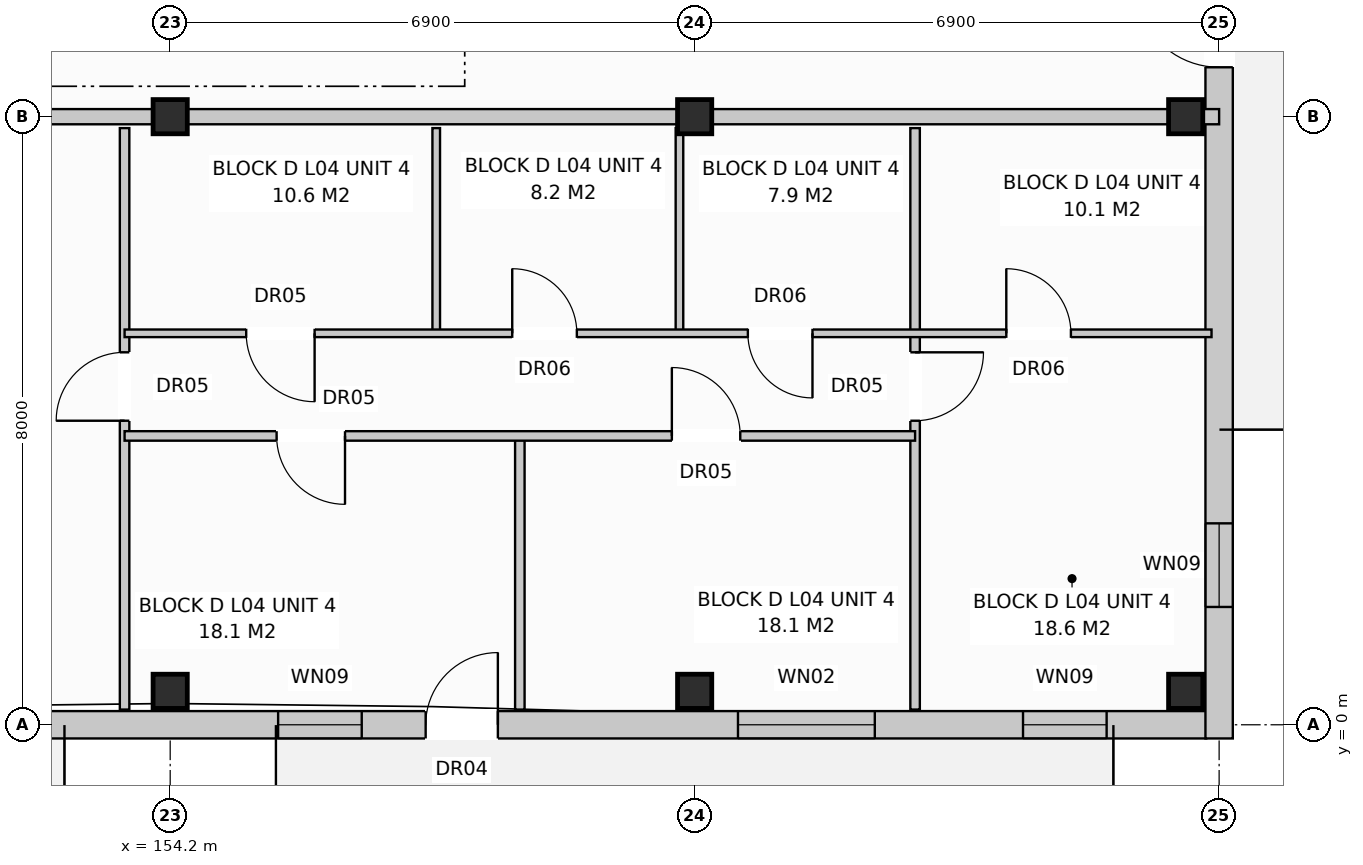
"""IFC4 building model, lengths in metres.
Left out: names, types, materials, properties, quantities, classifications, styles, units other than length and angle.
Written with IfcOpenShell. Run it as: python <this file> out.ifc"""

import sys

from ifc_helpers import new_model, si_unit, direction, frame, frame_2d, origin, origin_with_axes, origin_2d, place, context, subcontext, project, spatial, rectangle, extrude, element, fill, save


model = new_model("IFC4")
c1 = context("Model", 3, precision=1e-05, world=origin(), true_north=direction((0.0, 1.0)))
c2 = subcontext(c1, "Body", "Model", "MODEL_VIEW")
j1 = project(units=[si_unit("LENGTHUNIT", "METRE"), si_unit("PLANEANGLEUNIT", "RADIAN")], contexts=[c1])
p1 = place(None, origin())
s1 = spatial("IfcSite", under=j1, at=p1, CompositionType="ELEMENT")
p2 = place(p1, origin())
s2 = spatial("IfcBuilding", under=s1, at=p2, CompositionType="ELEMENT")
p3 = place(p2, frame((0.0, 0.0, 14.4)))
s3 = spatial("IfcBuildingStorey", under=s2, at=p3, CompositionType="ELEMENT", Elevation=14.4)
for number, where, z_axis, x_axis in (
    (1, (154.2, 0.44, 0.0), (0.0, 0.0, 1.0), (1.0, 0.0, 0.0)),
    (2, (154.2, 8.0, 0.0), (0.0, 0.0, 1.0), (1.0, 0.0, 0.0)),
    (3, (161.1, 0.44, 0.0), (0.0, 0.0, 1.0), (1.0, 0.0, 0.0)),
    (4, (161.1, 8.0, 0.0), (0.0, 0.0, 1.0), (1.0, 0.0, 0.0)),
    (5, (167.56, 0.44, 0.0), (0.0, 0.0, 1.0), (1.0, 0.0, 0.0)),
    (6, (167.56, 8.0, 0.0), (0.0, 0.0, 1.0), (1.0, 0.0, 0.0)),
):
    element("IfcColumn", number, at=place(p3, frame(where, z_axis=z_axis, x_axis=x_axis)), inside=s3, PredefinedType="COLUMN", context=c2, shape_type="SweptSolid", body=[
        extrude(rectangle(XDim=0.45, YDim=0.45, at=origin_2d()), origin(), (0.0, 0.0, 1.0), 3.2),
    ])
p4 = place(p3, frame((112.97, 0.0, 0.0), z_axis=(0.0, 0.0, 1.0), x_axis=(1.0, 0.0, 0.0)))
e7 = element("IfcWall", 7, at=p4, inside=s3, PredefinedType="STANDARD", context=c2, shape_type="SweptSolid", body=[
    extrude(rectangle(XDim=54.86, YDim=0.36, at=frame_2d((27.43, 0.0))), origin(), (0.0, 0.0, 1.0), 2.94),
])
p5 = place(p4, frame((5.127, 0.0, 0.0)))
e8 = element("IfcOpeningElement", 8, at=p5, cuts=e7, PredefinedType="OPENING", context=c2, shape_type="SweptSolid", body=[
    extrude(rectangle(XDim=0.95, YDim=2.1, at=frame_2d((0.475, 1.05))), frame((0.0, 0.192, 0.0), z_axis=(0.0, -1.0, 0.0), x_axis=(1.0, 0.0, 0.0)), (0.0, 0.0, 1.0), 0.384),
])
p6 = place(p4, frame((18.9, 0.0, 0.0)))
e9 = element("IfcOpeningElement", 9, at=p6, cuts=e7, PredefinedType="OPENING", context=c2, shape_type="SweptSolid", body=[
    extrude(rectangle(XDim=0.95, YDim=2.1, at=frame_2d((0.475, 1.05))), frame((0.0, 0.192, 0.0), z_axis=(0.0, -1.0, 0.0), x_axis=(1.0, 0.0, 0.0)), (0.0, 0.0, 1.0), 0.384),
])
p7 = place(p4, frame((32.7, 0.0, 0.0)))
e10 = element("IfcOpeningElement", 10, at=p7, cuts=e7, PredefinedType="OPENING", context=c2, shape_type="SweptSolid", body=[
    extrude(rectangle(XDim=0.95, YDim=2.1, at=frame_2d((0.475, 1.05))), frame((0.0, 0.192, 0.0), z_axis=(0.0, -1.0, 0.0), x_axis=(1.0, 0.0, 0.0)), (0.0, 0.0, 1.0), 0.384),
])
p8 = place(p4, frame((44.591, 0.0, 0.0)))
e11 = element("IfcOpeningElement", 11, at=p8, cuts=e7, PredefinedType="OPENING", context=c2, shape_type="SweptSolid", body=[
    extrude(rectangle(XDim=0.95, YDim=2.1, at=frame_2d((0.475, 1.05))), frame((0.0, 0.192, 0.0), z_axis=(0.0, -1.0, 0.0), x_axis=(1.0, 0.0, 0.0)), (0.0, 0.0, 1.0), 0.384),
])
p9 = place(p4, frame((0.9, 0.0, 0.8)))
e12 = element("IfcOpeningElement", 12, at=p9, cuts=e7, PredefinedType="OPENING", context=c2, shape_type="SweptSolid", body=[
    extrude(rectangle(XDim=1.8, YDim=1.7, at=frame_2d((0.9, 0.85))), frame((0.0, 0.192, 0.0), z_axis=(0.0, -1.0, 0.0), x_axis=(1.0, 0.0, 0.0)), (0.0, 0.0, 1.0), 0.384),
])
p10 = place(p4, frame((8.35, 0.0, 0.72)))
e13 = element("IfcOpeningElement", 13, at=p10, cuts=e7, PredefinedType="OPENING", context=c2, shape_type="SweptSolid", body=[
    extrude(rectangle(XDim=1.1, YDim=1.5, at=frame_2d((0.55, 0.75))), frame((0.0, 0.192, 0.0), z_axis=(0.0, -1.0, 0.0), x_axis=(1.0, 0.0, 0.0)), (0.0, 0.0, 1.0), 0.384),
])
p11 = place(p4, frame((11.225, 0.0, 0.8)))
e14 = element("IfcOpeningElement", 14, at=p11, cuts=e7, PredefinedType="OPENING", context=c2, shape_type="SweptSolid", body=[
    extrude(rectangle(XDim=1.95, YDim=1.65, at=frame_2d((0.975, 0.825))), frame((0.0, 0.192, 0.0), z_axis=(0.0, -1.0, 0.0), x_axis=(1.0, 0.0, 0.0)), (0.0, 0.0, 1.0), 0.384),
])
p12 = place(p4, frame((16.8, 0.0, 0.8)))
e15 = element("IfcOpeningElement", 15, at=p12, cuts=e7, PredefinedType="OPENING", context=c2, shape_type="SweptSolid", body=[
    extrude(rectangle(XDim=1.8, YDim=1.7, at=frame_2d((0.9, 0.85))), frame((0.0, 0.192, 0.0), z_axis=(0.0, -1.0, 0.0), x_axis=(1.0, 0.0, 0.0)), (0.0, 0.0, 1.0), 0.384),
])
p13 = place(p4, frame((22.25, 0.0, 0.72)))
e16 = element("IfcOpeningElement", 16, at=p13, cuts=e7, PredefinedType="OPENING", context=c2, shape_type="SweptSolid", body=[
    extrude(rectangle(XDim=1.9, YDim=1.85, at=frame_2d((0.95, 0.925))), frame((0.0, 0.192, 0.0), z_axis=(0.0, -1.0, 0.0), x_axis=(1.0, 0.0, 0.0)), (0.0, 0.0, 1.0), 0.384),
])
p14 = place(p4, frame((28.35, 0.0, 0.72)))
e17 = element("IfcOpeningElement", 17, at=p14, cuts=e7, PredefinedType="OPENING", context=c2, shape_type="SweptSolid", body=[
    extrude(rectangle(XDim=1.1, YDim=1.5, at=frame_2d((0.55, 0.75))), frame((0.0, 0.192, 0.0), z_axis=(0.0, -1.0, 0.0), x_axis=(1.0, 0.0, 0.0)), (0.0, 0.0, 1.0), 0.384),
])
p15 = place(p4, frame((30.6, 0.0, 0.8)))
e18 = element("IfcOpeningElement", 18, at=p15, cuts=e7, PredefinedType="OPENING", context=c2, shape_type="SweptSolid", body=[
    extrude(rectangle(XDim=1.8, YDim=1.7, at=frame_2d((0.9, 0.85))), frame((0.0, 0.192, 0.0), z_axis=(0.0, -1.0, 0.0), x_axis=(1.0, 0.0, 0.0)), (0.0, 0.0, 1.0), 0.384),
])
p16 = place(p4, frame((36.55, 0.0, 0.8)))
e19 = element("IfcOpeningElement", 19, at=p16, cuts=e7, PredefinedType="OPENING", context=c2, shape_type="SweptSolid", body=[
    extrude(rectangle(XDim=1.9, YDim=1.85, at=frame_2d((0.95, 0.925))), frame((0.0, 0.192, 0.0), z_axis=(0.0, -1.0, 0.0), x_axis=(1.0, 0.0, 0.0)), (0.0, 0.0, 1.0), 0.384),
])
p17 = place(p4, frame((42.65, 0.0, 0.72)))
e20 = element("IfcOpeningElement", 20, at=p17, cuts=e7, PredefinedType="OPENING", context=c2, shape_type="SweptSolid", body=[
    extrude(rectangle(XDim=1.1, YDim=1.5, at=frame_2d((0.55, 0.75))), frame((0.0, 0.192, 0.0), z_axis=(0.0, -1.0, 0.0), x_axis=(1.0, 0.0, 0.0)), (0.0, 0.0, 1.0), 0.384),
])
p18 = place(p4, frame((48.7, 0.0, 0.8)))
e21 = element("IfcOpeningElement", 21, at=p18, cuts=e7, PredefinedType="OPENING", context=c2, shape_type="SweptSolid", body=[
    extrude(rectangle(XDim=1.8, YDim=1.7, at=frame_2d((0.9, 0.85))), frame((0.0, 0.192, 0.0), z_axis=(0.0, -1.0, 0.0), x_axis=(1.0, 0.0, 0.0)), (0.0, 0.0, 1.0), 0.384),
])
p19 = place(p4, frame((52.45, 0.0, 0.72)))
e22 = element("IfcOpeningElement", 22, at=p19, cuts=e7, PredefinedType="OPENING", context=c2, shape_type="SweptSolid", body=[
    extrude(rectangle(XDim=1.1, YDim=1.5, at=frame_2d((0.55, 0.75))), frame((0.0, 0.192, 0.0), z_axis=(0.0, -1.0, 0.0), x_axis=(1.0, 0.0, 0.0)), (0.0, 0.0, 1.0), 0.384),
])
p20 = place(p3, frame((168.0, -0.18, 0.0), z_axis=(0.0, 0.0, 1.0), x_axis=(0.0, 1.0, 0.0)))
e23 = element("IfcWall", 23, at=p20, inside=s3, PredefinedType="STANDARD", context=c2, shape_type="SweptSolid", body=[
    extrude(rectangle(XDim=18.76, YDim=0.36, at=frame_2d((9.38, 0.0))), origin(), (0.0, 0.0, 1.0), 2.94),
])
p21 = place(p20, frame((8.83, 0.0, 0.0)))
e24 = element("IfcOpeningElement", 24, at=p21, cuts=e23, PredefinedType="OPENING", context=c2, shape_type="SweptSolid", body=[
    extrude(rectangle(XDim=1.1, YDim=2.1, at=frame_2d((0.55, 1.05))), frame((0.0, 0.192, 0.0), z_axis=(0.0, -1.0, 0.0), x_axis=(1.0, 0.0, 0.0)), (0.0, 0.0, 1.0), 0.384),
])
p22 = place(p20, frame((1.73, 0.0, 0.72)))
e25 = element("IfcOpeningElement", 25, at=p22, cuts=e23, PredefinedType="OPENING", context=c2, shape_type="SweptSolid", body=[
    extrude(rectangle(XDim=1.1, YDim=1.5, at=frame_2d((0.55, 0.75))), frame((0.0, 0.192, 0.0), z_axis=(0.0, -1.0, 0.0), x_axis=(1.0, 0.0, 0.0)), (0.0, 0.0, 1.0), 0.384),
])
p23 = place(p20, frame((15.93, 0.0, 0.72)))
e26 = element("IfcOpeningElement", 26, at=p23, cuts=e23, PredefinedType="OPENING", context=c2, shape_type="SweptSolid", body=[
    extrude(rectangle(XDim=1.1, YDim=1.5, at=frame_2d((0.55, 0.75))), frame((0.0, 0.192, 0.0), z_axis=(0.0, -1.0, 0.0), x_axis=(1.0, 0.0, 0.0)), (0.0, 0.0, 1.0), 0.384),
])
p24 = place(p3, frame((147.3, 8.0, 0.0), z_axis=(0.0, 0.0, 1.0), x_axis=(1.0, 0.0, 0.0)))
e27 = element("IfcWall", 27, at=p24, inside=s3, PredefinedType="PARTITIONING", context=c2, shape_type="SweptSolid", body=[
    extrude(rectangle(XDim=20.7, YDim=0.2, at=frame_2d((10.35, 0.0))), origin(), (0.0, 0.0, 1.0), 2.38),
])
p25 = place(p24, frame((2.4, 0.0, 0.0)))
e28 = element("IfcOpeningElement", 28, at=p25, cuts=e27, PredefinedType="OPENING", context=c2, shape_type="SweptSolid", body=[
    extrude(rectangle(XDim=0.95, YDim=2.15, at=frame_2d((0.475, 1.075))), frame((0.0, 0.112, 0.0), z_axis=(0.0, -1.0, 0.0), x_axis=(1.0, 0.0, 0.0)), (0.0, 0.0, 1.0), 0.224),
])
p26 = place(p3, frame((153.6, 7.85, 0.0), z_axis=(0.0, 0.0, 1.0), x_axis=(0.0, -1.0, 0.0)))
e29 = element("IfcWall", 29, at=p26, inside=s3, PredefinedType="PARTITIONING", context=c2, shape_type="SweptSolid", body=[
    extrude(rectangle(XDim=7.65, YDim=0.125, at=frame_2d((3.825, 0.0))), origin(), (0.0, 0.0, 1.0), 2.94),
])
p27 = place(p26, frame((2.95, 0.0, 0.0)))
e30 = element("IfcOpeningElement", 30, at=p27, cuts=e29, PredefinedType="OPENING", context=c2, shape_type="SweptSolid", body=[
    extrude(rectangle(XDim=0.9, YDim=2.1, at=frame_2d((0.45, 1.05))), frame((0.0, 0.074, 0.0), z_axis=(0.0, -1.0, 0.0), x_axis=(1.0, 0.0, 0.0)), (0.0, 0.0, 1.0), 0.149),
])
p28 = place(p3, frame((157.7, 7.85, 0.0), z_axis=(0.0, 0.0, 1.0), x_axis=(0.0, -1.0, 0.0)))
e31 = element("IfcWall", 31, at=p28, inside=s3, PredefinedType="PARTITIONING", context=c2, shape_type="SweptSolid", body=[
    extrude(rectangle(XDim=2.7, YDim=0.1, at=frame_2d((1.35, 0.0))), origin(), (0.0, 0.0, 1.0), 2.94),
])
p29 = place(p3, frame((160.9, 7.85, 0.0), z_axis=(0.0, 0.0, 1.0), x_axis=(0.0, -1.0, 0.0)))
e32 = element("IfcWall", 32, at=p29, inside=s3, PredefinedType="PARTITIONING", context=c2, shape_type="SweptSolid", body=[
    extrude(rectangle(XDim=2.7, YDim=0.1, at=frame_2d((1.35, 0.0))), origin(), (0.0, 0.0, 1.0), 2.38),
])
p30 = place(p3, frame((158.8, 3.8, 0.0), z_axis=(0.0, 0.0, 1.0), x_axis=(0.0, -1.0, 0.0)))
e33 = element("IfcWall", 33, at=p30, inside=s3, PredefinedType="PARTITIONING", context=c2, shape_type="SweptSolid", body=[
    extrude(rectangle(XDim=3.6, YDim=0.125, at=frame_2d((1.8, 0.0))), origin(), (0.0, 0.0, 1.0), 2.94),
])
p31 = place(p3, frame((164.0, 7.85, 0.0), z_axis=(0.0, 0.0, 1.0), x_axis=(0.0, -1.0, 0.0)))
e34 = element("IfcWall", 34, at=p31, inside=s3, PredefinedType="PARTITIONING", context=c2, shape_type="SweptSolid", body=[
    extrude(rectangle(XDim=7.65, YDim=0.125, at=frame_2d((3.825, 0.0))), origin(), (0.0, 0.0, 1.0), 2.94),
])
p32 = place(p31, frame((2.95, 0.0, 0.0)))
e35 = element("IfcOpeningElement", 35, at=p32, cuts=e34, PredefinedType="OPENING", context=c2, shape_type="SweptSolid", body=[
    extrude(rectangle(XDim=0.9, YDim=2.1, at=frame_2d((0.45, 1.05))), frame((0.0, 0.074, 0.0), z_axis=(0.0, -1.0, 0.0), x_axis=(1.0, 0.0, 0.0)), (0.0, 0.0, 1.0), 0.149),
])
p33 = place(p3, frame((153.6, 5.15, 0.0), z_axis=(0.0, 0.0, 1.0), x_axis=(1.0, 0.0, 0.0)))
e36 = element("IfcWall", 36, at=p33, inside=s3, PredefinedType="PARTITIONING", context=c2, shape_type="SweptSolid", body=[
    extrude(rectangle(XDim=14.3, YDim=0.1, at=frame_2d((7.15, 0.0))), origin(), (0.0, 0.0, 1.0), 2.94),
])
p34 = place(p33, frame((1.6, 0.0, 0.0)))
e37 = element("IfcOpeningElement", 37, at=p34, cuts=e36, PredefinedType="OPENING", context=c2, shape_type="SweptSolid", body=[
    extrude(rectangle(XDim=0.9, YDim=2.1, at=frame_2d((0.45, 1.05))), frame((0.0, 0.062, 0.0), z_axis=(0.0, -1.0, 0.0), x_axis=(1.0, 0.0, 0.0)), (0.0, 0.0, 1.0), 0.124),
])
p35 = place(p33, frame((5.1, 0.0, 0.0)))
e38 = element("IfcOpeningElement", 38, at=p35, cuts=e36, PredefinedType="OPENING", context=c2, shape_type="SweptSolid", body=[
    extrude(rectangle(XDim=0.85, YDim=2.05, at=frame_2d((0.425, 1.025))), frame((0.0, 0.062, 0.0), z_axis=(0.0, -1.0, 0.0), x_axis=(1.0, 0.0, 0.0)), (0.0, 0.0, 1.0), 0.124),
])
p36 = place(p33, frame((8.2, 0.0, 0.0)))
e39 = element("IfcOpeningElement", 39, at=p36, cuts=e36, PredefinedType="OPENING", context=c2, shape_type="SweptSolid", body=[
    extrude(rectangle(XDim=0.85, YDim=2.05, at=frame_2d((0.425, 1.025))), frame((0.0, 0.062, 0.0), z_axis=(0.0, -1.0, 0.0), x_axis=(1.0, 0.0, 0.0)), (0.0, 0.0, 1.0), 0.124),
])
p37 = place(p33, frame((11.6, 0.0, 0.0)))
e40 = element("IfcOpeningElement", 40, at=p37, cuts=e36, PredefinedType="OPENING", context=c2, shape_type="SweptSolid", body=[
    extrude(rectangle(XDim=0.85, YDim=2.05, at=frame_2d((0.425, 1.025))), frame((0.0, 0.062, 0.0), z_axis=(0.0, -1.0, 0.0), x_axis=(1.0, 0.0, 0.0)), (0.0, 0.0, 1.0), 0.124),
])
p38 = place(p3, frame((153.6, 3.8, 0.0), z_axis=(0.0, 0.0, 1.0), x_axis=(1.0, 0.0, 0.0)))
e41 = element("IfcWall", 41, at=p38, inside=s3, PredefinedType="PARTITIONING", context=c2, shape_type="SweptSolid", body=[
    extrude(rectangle(XDim=10.4, YDim=0.125, at=frame_2d((5.2, 0.0))), origin(), (0.0, 0.0, 1.0), 2.94),
])
p39 = place(p38, frame((2.0, 0.0, 0.0)))
e42 = element("IfcOpeningElement", 42, at=p39, cuts=e41, PredefinedType="OPENING", context=c2, shape_type="SweptSolid", body=[
    extrude(rectangle(XDim=0.9, YDim=2.1, at=frame_2d((0.45, 1.05))), frame((0.0, 0.074, 0.0), z_axis=(0.0, -1.0, 0.0), x_axis=(1.0, 0.0, 0.0)), (0.0, 0.0, 1.0), 0.149),
])
p40 = place(p38, frame((7.2, 0.0, 0.0)))
e43 = element("IfcOpeningElement", 43, at=p40, cuts=e41, PredefinedType="OPENING", context=c2, shape_type="SweptSolid", body=[
    extrude(rectangle(XDim=0.9, YDim=2.1, at=frame_2d((0.45, 1.05))), frame((0.0, 0.074, 0.0), z_axis=(0.0, -1.0, 0.0), x_axis=(1.0, 0.0, 0.0)), (0.0, 0.0, 1.0), 0.149),
])
p41 = place(p8, origin_with_axes())
e44 = element("IfcDoor", 44, at=p41, inside=s3, OperationType="SINGLE_SWING_RIGHT", PredefinedType="DOOR", context=c2, shape_type="SweptSolid", body=[
    extrude(rectangle(XDim=0.95, YDim=2.1, at=frame_2d((0.475, 1.05))), frame((0.0, 0.025, 0.0), z_axis=(0.0, -1.0, 0.0), x_axis=(1.0, 0.0, 0.0)), (0.0, 0.0, 1.0), 0.05),
])
fill(e11, e44)
p42 = place(p17, origin_with_axes())
e45 = element("IfcWindow", 45, at=p42, inside=s3, PartitioningType="SINGLE_PANEL", PredefinedType="WINDOW", context=c2, shape_type="SweptSolid", body=[
    extrude(rectangle(XDim=1.1, YDim=1.5, at=frame_2d((0.55, 0.75))), frame((0.0, 0.03, 0.0), z_axis=(0.0, -1.0, 0.0), x_axis=(1.0, 0.0, 0.0)), (0.0, 0.0, 1.0), 0.06),
])
fill(e20, e45)
p43 = place(p18, origin_with_axes())
e46 = element("IfcWindow", 46, at=p43, inside=s3, PartitioningType="SINGLE_PANEL", PredefinedType="WINDOW", context=c2, shape_type="SweptSolid", body=[
    extrude(rectangle(XDim=1.8, YDim=1.7, at=frame_2d((0.9, 0.85))), frame((0.0, 0.03, 0.0), z_axis=(0.0, -1.0, 0.0), x_axis=(1.0, 0.0, 0.0)), (0.0, 0.0, 1.0), 0.06),
])
fill(e21, e46)
p44 = place(p19, origin_with_axes())
e47 = element("IfcWindow", 47, at=p44, inside=s3, PartitioningType="SINGLE_PANEL", PredefinedType="WINDOW", context=c2, shape_type="SweptSolid", body=[
    extrude(rectangle(XDim=1.1, YDim=1.5, at=frame_2d((0.55, 0.75))), frame((0.0, 0.03, 0.0), z_axis=(0.0, -1.0, 0.0), x_axis=(1.0, 0.0, 0.0)), (0.0, 0.0, 1.0), 0.06),
])
fill(e22, e47)
p45 = place(p21, origin_with_axes())
e48 = element("IfcDoor", 48, at=p45, inside=s3, OperationType="SINGLE_SWING_RIGHT", PredefinedType="DOOR", context=c2, shape_type="SweptSolid", body=[
    extrude(rectangle(XDim=1.1, YDim=2.1, at=frame_2d((0.55, 1.05))), frame((0.0, 0.025, 0.0), z_axis=(0.0, -1.0, 0.0), x_axis=(1.0, 0.0, 0.0)), (0.0, 0.0, 1.0), 0.05),
])
fill(e24, e48)
p46 = place(p22, origin_with_axes())
e49 = element("IfcWindow", 49, at=p46, inside=s3, PartitioningType="SINGLE_PANEL", PredefinedType="WINDOW", context=c2, shape_type="SweptSolid", body=[
    extrude(rectangle(XDim=1.1, YDim=1.5, at=frame_2d((0.55, 0.75))), frame((0.0, 0.03, 0.0), z_axis=(0.0, -1.0, 0.0), x_axis=(1.0, 0.0, 0.0)), (0.0, 0.0, 1.0), 0.06),
])
fill(e25, e49)
p47 = place(p27, frame((0.9, 0.0, 0.0), z_axis=(0.0, 0.0, 1.0), x_axis=(-1.0, 0.0, 0.0)))
e50 = element("IfcDoor", 50, at=p47, inside=s3, OperationType="SINGLE_SWING_RIGHT", PredefinedType="DOOR", context=c2, shape_type="SweptSolid", body=[
    extrude(rectangle(XDim=0.9, YDim=2.1, at=frame_2d((0.45, 1.05))), frame((0.0, 0.025, 0.0), z_axis=(0.0, -1.0, 0.0), x_axis=(1.0, 0.0, 0.0)), (0.0, 0.0, 1.0), 0.05),
])
fill(e30, e50)
p48 = place(p32, origin_with_axes())
e51 = element("IfcDoor", 51, at=p48, inside=s3, OperationType="SINGLE_SWING_LEFT", PredefinedType="DOOR", context=c2, shape_type="SweptSolid", body=[
    extrude(rectangle(XDim=0.9, YDim=2.1, at=frame_2d((0.45, 1.05))), frame((0.0, 0.025, 0.0), z_axis=(0.0, -1.0, 0.0), x_axis=(1.0, 0.0, 0.0)), (0.0, 0.0, 1.0), 0.05),
])
fill(e35, e51)
p49 = place(p34, frame((0.9, 0.0, 0.0), z_axis=(0.0, 0.0, 1.0), x_axis=(-1.0, 0.0, 0.0)))
e52 = element("IfcDoor", 52, at=p49, inside=s3, OperationType="SINGLE_SWING_RIGHT", PredefinedType="DOOR", context=c2, shape_type="SweptSolid", body=[
    extrude(rectangle(XDim=0.9, YDim=2.1, at=frame_2d((0.45, 1.05))), frame((0.0, 0.025, 0.0), z_axis=(0.0, -1.0, 0.0), x_axis=(1.0, 0.0, 0.0)), (0.0, 0.0, 1.0), 0.05),
])
fill(e37, e52)
p50 = place(p35, origin_with_axes())
e53 = element("IfcDoor", 53, at=p50, inside=s3, OperationType="SINGLE_SWING_LEFT", PredefinedType="DOOR", context=c2, shape_type="SweptSolid", body=[
    extrude(rectangle(XDim=0.85, YDim=2.05, at=frame_2d((0.425, 1.025))), frame((0.0, 0.025, 0.0), z_axis=(0.0, -1.0, 0.0), x_axis=(1.0, 0.0, 0.0)), (0.0, 0.0, 1.0), 0.05),
])
fill(e38, e53)
p51 = place(p36, frame((0.85, 0.0, 0.0), z_axis=(0.0, 0.0, 1.0), x_axis=(-1.0, 0.0, 0.0)))
e54 = element("IfcDoor", 54, at=p51, inside=s3, OperationType="SINGLE_SWING_RIGHT", PredefinedType="DOOR", context=c2, shape_type="SweptSolid", body=[
    extrude(rectangle(XDim=0.85, YDim=2.05, at=frame_2d((0.425, 1.025))), frame((0.0, 0.025, 0.0), z_axis=(0.0, -1.0, 0.0), x_axis=(1.0, 0.0, 0.0)), (0.0, 0.0, 1.0), 0.05),
])
fill(e39, e54)
p52 = place(p37, origin_with_axes())
e55 = element("IfcDoor", 55, at=p52, inside=s3, OperationType="SINGLE_SWING_LEFT", PredefinedType="DOOR", context=c2, shape_type="SweptSolid", body=[
    extrude(rectangle(XDim=0.85, YDim=2.05, at=frame_2d((0.425, 1.025))), frame((0.0, 0.025, 0.0), z_axis=(0.0, -1.0, 0.0), x_axis=(1.0, 0.0, 0.0)), (0.0, 0.0, 1.0), 0.05),
])
fill(e40, e55)
p53 = place(p39, frame((0.9, 0.0, 0.0), z_axis=(0.0, 0.0, 1.0), x_axis=(-1.0, 0.0, 0.0)))
e56 = element("IfcDoor", 56, at=p53, inside=s3, OperationType="SINGLE_SWING_RIGHT", PredefinedType="DOOR", context=c2, shape_type="SweptSolid", body=[
    extrude(rectangle(XDim=0.9, YDim=2.1, at=frame_2d((0.45, 1.05))), frame((0.0, 0.025, 0.0), z_axis=(0.0, -1.0, 0.0), x_axis=(1.0, 0.0, 0.0)), (0.0, 0.0, 1.0), 0.05),
])
fill(e42, e56)
p54 = place(p40, origin_with_axes())
e57 = element("IfcDoor", 57, at=p54, inside=s3, OperationType="SINGLE_SWING_LEFT", PredefinedType="DOOR", context=c2, shape_type="SweptSolid", body=[
    extrude(rectangle(XDim=0.9, YDim=2.1, at=frame_2d((0.45, 1.05))), frame((0.0, 0.025, 0.0), z_axis=(0.0, -1.0, 0.0), x_axis=(1.0, 0.0, 0.0)), (0.0, 0.0, 1.0), 0.05),
])
fill(e43, e57)
save(model, sys.argv[1])
